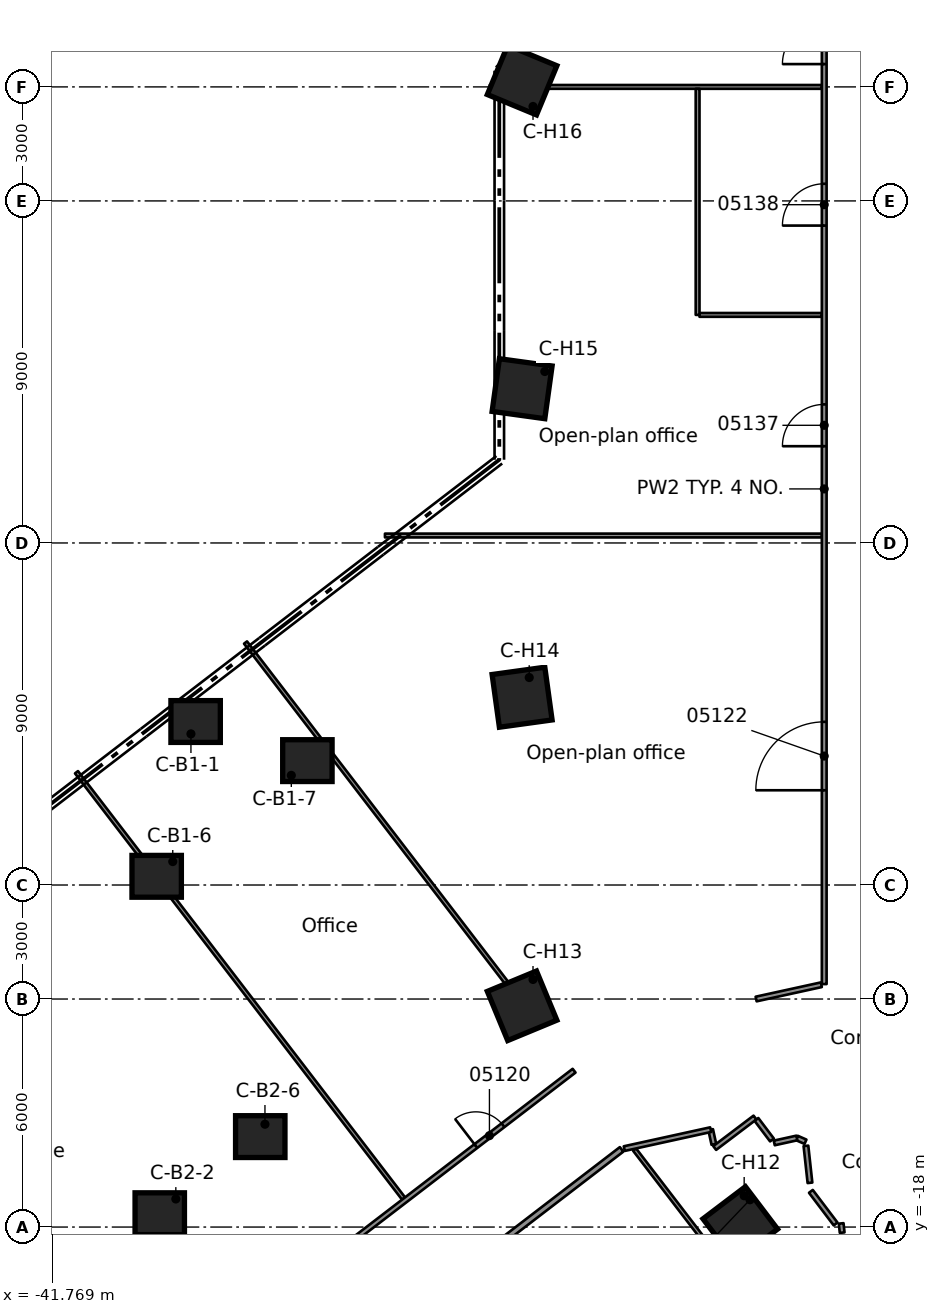
"""IFC4 building model, lengths in metres.
Left out: names, types, materials, properties, quantities, classifications, styles, units other than length and angle.
Written with IfcOpenShell. Run it as: python <this file> out.ifc"""

import sys

from ifc_helpers import new_model, si_unit, direction, frame, frame_2d, origin, origin_2d, place, context, subcontext, project, spatial, rectangle, extrude, element, fill, save


model = new_model("IFC4")
c1 = context("Model", 3, precision=1e-05, world=origin(), true_north=direction((0.0, 1.0)))
c2 = subcontext(c1, "Body", "Model", "MODEL_VIEW")
j1 = project(units=[si_unit("LENGTHUNIT", "METRE"), si_unit("PLANEANGLEUNIT", "RADIAN")], contexts=[c1])
p1 = place(None, origin())
s1 = spatial("IfcSite", under=j1, at=p1, CompositionType="ELEMENT")
p2 = place(p1, origin())
s2 = spatial("IfcBuilding", under=s1, at=p2, CompositionType="ELEMENT")
p3 = place(p2, frame((0.0, 0.0, 25.1)))
s3 = spatial("IfcBuildingStorey", under=s2, at=p3, CompositionType="ELEMENT", Elevation=25.1)
for number, where, z_axis, x_axis in (
    (1, (-37.991, -4.698, 0.0), (0.0, 0.0, 1.0), (1.0, 0.0, 0.0)),
    (2, (-39.016, -8.771, 0.0), (0.0, 0.0, 1.0), (1.0, 0.0, 0.0)),
    (3, (-35.05, -5.727, 0.0), (0.0, 0.0, 1.0), (1.0, 0.0, 0.0)),
    (4, (-38.935, -17.649, 0.0), (0.0, 0.0, 1.0), (1.0, 0.0, 0.0)),
    (5, (-36.29, -15.62, 0.0), (0.0, 0.0, 1.0), (1.0, 0.0, 0.0)),
):
    element("IfcColumn", number, at=place(p3, frame(where, z_axis=z_axis, x_axis=x_axis)), inside=s3, PredefinedType="COLUMN", context=c2, shape_type="SweptSolid", body=[
        extrude(rectangle(XDim=1.3, YDim=1.1, at=origin_2d()), origin(), (0.0, 0.0, 1.0), 4.1),
    ])
for number, where, z_axis, x_axis in (
    (6, (-23.659, -17.919, 0.0), (0.0, 0.0, 1.0), (-0.797, -0.604, 0.0)),
    (7, (-29.4, -12.178, 0.0), (0.0, 0.0, 1.0), (-0.924, -0.383, 0.0)),
    (8, (-29.4, -4.059, 0.0), (0.0, 0.0, 1.0), (-0.991, -0.137, 0.0)),
    (9, (-29.4, 4.059, 0.0), (0.0, 0.0, 1.0), (-0.991, 0.137, 0.0)),
    (10, (-29.4, 12.178, 0.0), (0.0, 0.0, 1.0), (-0.924, 0.383, 0.0)),
):
    element("IfcColumn", number, at=place(p3, frame(where, z_axis=z_axis, x_axis=x_axis)), inside=s3, PredefinedType="COLUMN", context=c2, shape_type="SweptSolid", body=[
        extrude(rectangle(XDim=1.4, YDim=1.4, at=origin_2d()), origin(), (0.0, 0.0, 1.0), 4.1),
    ])
p4 = place(p3, frame((-21.004, -17.904, 0.0), z_axis=(0.0, 0.0, 1.0), x_axis=(0.105933230141, -0.994373245191, 0.0)))
e11 = element("IfcWall", 11, at=p4, inside=s3, PredefinedType="PARTITIONING", context=c2, shape_type="SweptSolid", body=[
    extrude(rectangle(XDim=0.244, YDim=0.125, at=frame_2d((0.122, 0.0))), origin(), (0.0, 0.0, 1.0), 3.68),
])
p5 = place(p3, frame((-21.931, -15.864, 0.0), z_axis=(0.0, 0.0, 1.0), x_axis=(0.10837572028, -0.99411000561, 0.0)))
e12 = element("IfcWall", 12, at=p5, inside=s3, PredefinedType="PARTITIONING", context=c2, shape_type="SweptSolid", body=[
    extrude(rectangle(XDim=0.978, YDim=0.125, at=frame_2d((0.489, 0.0))), origin(), (0.0, 0.0, 1.0), 3.68),
])
p6 = place(p3, frame((-24.438, -15.437, 0.0), z_axis=(0.0, 0.0, 1.0), x_axis=(0.212096867325, -0.977248647413, 0.0)))
e13 = element("IfcWall", 13, at=p6, inside=s3, PredefinedType="PARTITIONING", context=c2, shape_type="SweptSolid", body=[
    extrude(rectangle(XDim=0.396, YDim=0.125, at=frame_2d((0.198, 0.0))), origin(), (0.0, 0.0, 1.0), 3.68),
])
p7 = place(p3, frame((-23.234, -15.168, 0.0), z_axis=(0.0, 0.0, 1.0), x_axis=(0.602990949897, -0.797748026849, 0.0)))
e14 = element("IfcWall", 14, at=p7, inside=s3, PredefinedType="PARTITIONING", context=c2, shape_type="SweptSolid", body=[
    extrude(rectangle(XDim=0.678, YDim=0.125, at=frame_2d((0.339, 0.0))), origin(), (0.0, 0.0, 1.0), 3.68),
])
p8 = place(p3, frame((-21.801, -17.061, 0.0), z_axis=(0.0, 0.0, 1.0), x_axis=(0.604123687543, -0.796890563471, 0.0)))
e15 = element("IfcWall", 15, at=p8, inside=s3, PredefinedType="PARTITIONING", context=c2, shape_type="SweptSolid", body=[
    extrude(rectangle(XDim=1.078, YDim=0.125, at=frame_2d((0.539, 0.0))), origin(), (0.0, 0.0, 1.0), 3.68),
])
p9 = place(p3, frame((-41.126, -6.033, 0.0), z_axis=(0.0, 0.0, 1.0), x_axis=(0.608775561638, -0.793342495743, 0.0)))
e16 = element("IfcWall", 16, at=p9, inside=s3, PredefinedType="PARTITIONING", context=c2, shape_type="SweptSolid", body=[
    extrude(rectangle(XDim=14.136, YDim=0.1, at=frame_2d((7.068, 0.0))), origin(), (0.0, 0.0, 1.0), 3.68),
])
p10 = place(p3, frame((-36.678, -2.62, 0.0), z_axis=(0.0, 0.0, 1.0), x_axis=(0.608767789656, -0.793348459555, 0.0)))
e17 = element("IfcWall", 17, at=p10, inside=s3, PredefinedType="PARTITIONING", context=c2, shape_type="SweptSolid", body=[
    extrude(rectangle(XDim=11.842, YDim=0.1, at=frame_2d((5.921, 0.0))), origin(), (0.0, 0.0, 1.0), 3.68),
])
p11 = place(p3, frame((-26.44, -15.962, 0.0), z_axis=(0.0, 0.0, 1.0), x_axis=(0.608697215762, -0.79340260872, 0.0)))
e18 = element("IfcWall", 18, at=p11, inside=s3, PredefinedType="PARTITIONING", context=c2, shape_type="SweptSolid", body=[
    extrude(rectangle(XDim=6.79, YDim=0.1, at=frame_2d((3.395, 0.0))), origin(), (0.0, 0.0, 1.0), 3.68),
])
p12 = place(p3, frame((-22.17, -15.656, 0.0), z_axis=(0.0, 0.0, 1.0), x_axis=(0.914864311429, -0.403761429156, 0.0)))
e19 = element("IfcWall", 19, at=p12, inside=s3, PredefinedType="PARTITIONING", context=c2, shape_type="SweptSolid", body=[
    extrude(rectangle(XDim=0.248, YDim=0.125, at=frame_2d((0.124, 0.0))), origin(), (0.0, 0.0, 1.0), 3.68),
])
p13 = place(p3, frame((-33.009, 0.196, 0.0), z_axis=(0.0, 0.0, 1.0), x_axis=(1.0, 0.0, 0.0)))
e20 = element("IfcWall", 20, at=p13, inside=s3, PredefinedType="PARTITIONING", context=c2, shape_type="SweptSolid", body=[
    extrude(rectangle(XDim=11.497, YDim=0.1, at=frame_2d((5.749, 0.0))), origin(), (0.0, 0.0, 1.0), 3.68),
])
p14 = place(p3, frame((-24.732, 6.001, 0.0), z_axis=(0.0, 0.0, 1.0), x_axis=(1.0, 0.0, 0.0)))
e21 = element("IfcWall", 21, at=p14, inside=s3, PredefinedType="PARTITIONING", context=c2, shape_type="SweptSolid", body=[
    extrude(rectangle(XDim=3.22, YDim=0.1, at=frame_2d((1.61, 0.0))), origin(), (0.0, 0.0, 1.0), 3.68),
])
p15 = place(p3, frame((-30.25, 12.0, 0.0), z_axis=(0.0, 0.0, 1.0), x_axis=(1.0, 0.0, 0.0)))
e22 = element("IfcWall", 22, at=p15, inside=s3, PredefinedType="PARTITIONING", context=c2, shape_type="SweptSolid", body=[
    extrude(rectangle(XDim=8.738, YDim=0.1, at=frame_2d((4.369, 0.0))), origin(), (0.0, 0.0, 1.0), 3.68),
])
p16 = place(p3, frame((-26.712, -15.936, 0.0), z_axis=(0.0, 0.0, 1.0), x_axis=(0.976756126143, 0.214353609817, 0.0)))
e23 = element("IfcWall", 23, at=p16, inside=s3, PredefinedType="PARTITIONING", context=c2, shape_type="SweptSolid", body=[
    extrude(rectangle(XDim=2.328, YDim=0.125, at=frame_2d((1.164, 0.0))), origin(), (0.0, 0.0, 1.0), 3.68),
])
p17 = place(p3, frame((-22.765, -15.787, 0.0), z_axis=(0.0, 0.0, 1.0), x_axis=(0.97657209397, 0.215190486033, 0.0)))
e24 = element("IfcWall", 24, at=p17, inside=s3, PredefinedType="PARTITIONING", context=c2, shape_type="SweptSolid", body=[
    extrude(rectangle(XDim=0.609, YDim=0.125, at=frame_2d((0.305, 0.0))), origin(), (0.0, 0.0, 1.0), 3.68),
])
p18 = place(p3, frame((-23.242, -12.0, 0.0), z_axis=(0.0, 0.0, 1.0), x_axis=(0.976830155766, 0.214015996568, 0.0)))
e25 = element("IfcWall", 25, at=p18, inside=s3, PredefinedType="PARTITIONING", context=c2, shape_type="SweptSolid", body=[
    extrude(rectangle(XDim=1.757, YDim=0.125, at=frame_2d((0.878, 0.0))), origin(), (0.0, 0.0, 1.0), 3.68),
])
p19 = place(p3, frame((-24.332, -15.92, 0.0), z_axis=(0.0, 0.0, 1.0), x_axis=(0.797480426333, 0.603344818172, 0.0)))
e26 = element("IfcWall", 26, at=p19, inside=s3, PredefinedType="PARTITIONING", context=c2, shape_type="SweptSolid", body=[
    extrude(rectangle(XDim=1.329, YDim=0.125, at=frame_2d((0.665, 0.0))), origin(), (0.0, 0.0, 1.0), 3.68),
])
p20 = place(p3, frame((-44.11, -29.247, 0.0), z_axis=(0.0, 0.0, 1.0), x_axis=(0.793471030698, 0.608608021179, 0.0)))
e27 = element("IfcWall", 27, at=p20, inside=s3, PredefinedType="PARTITIONING", context=c2, shape_type="SweptSolid", body=[
    extrude(rectangle(XDim=21.838, YDim=0.15, at=frame_2d((10.919, 0.0))), origin(), (0.0, 0.0, 1.0), 3.68),
])
p21 = place(p3, frame((-35.881, -19.906, 0.0), z_axis=(0.0, 0.0, 1.0), x_axis=(0.793491146474, 0.608581794394, 0.0)))
e28 = element("IfcWall", 28, at=p21, inside=s3, PredefinedType="PARTITIONING", context=c2, shape_type="SweptSolid", body=[
    extrude(rectangle(XDim=9.892, YDim=0.125, at=frame_2d((4.946, 0.0))), origin(), (0.0, 0.0, 1.0), 3.68),
])
p22 = place(p21, frame((6.634, 0.0, 0.0)))
e29 = element("IfcOpeningElement", 29, at=p22, cuts=e28, PredefinedType="OPENING", context=c2, shape_type="SweptSolid", body=[
    extrude(rectangle(XDim=0.9, YDim=2.1, at=frame_2d((0.45, 1.05))), frame((0.0, 0.073, 0.0), z_axis=(0.0, -1.0, 0.0), x_axis=(1.0, 0.0, 0.0)), (0.0, 0.0, 1.0), 0.145),
])
p23 = place(p3, frame((-21.45, -11.607, 0.0), z_axis=(0.0, 0.0, 1.0), x_axis=(0.0, 1.0, 0.0)))
e30 = element("IfcWall", 30, at=p23, inside=s3, PredefinedType="PARTITIONING", context=c2, shape_type="SweptSolid", body=[
    extrude(rectangle(XDim=26.058, YDim=0.125, at=frame_2d((13.029, 0.0))), origin(), (0.0, 0.0, 1.0), 3.68),
])
p24 = place(p23, frame((5.1, 0.0, 0.0)))
e31 = element("IfcOpeningElement", 31, at=p24, cuts=e30, PredefinedType="OPENING", context=c2, shape_type="SweptSolid", body=[
    extrude(rectangle(XDim=1.8, YDim=2.1, at=frame_2d((0.9, 1.05))), frame((0.0, 0.073, 0.0), z_axis=(0.0, -1.0, 0.0), x_axis=(1.0, 0.0, 0.0)), (0.0, 0.0, 1.0), 0.145),
])
p25 = place(p23, frame((24.207, 0.0, 0.0)))
e32 = element("IfcOpeningElement", 32, at=p25, cuts=e30, PredefinedType="OPENING", context=c2, shape_type="SweptSolid", body=[
    extrude(rectangle(XDim=1.1, YDim=2.1, at=frame_2d((0.55, 1.05))), frame((0.0, 0.073, 0.0), z_axis=(0.0, -1.0, 0.0), x_axis=(1.0, 0.0, 0.0)), (0.0, 0.0, 1.0), 0.145),
])
p26 = place(p23, frame((14.153, 0.0, 0.0)))
e33 = element("IfcOpeningElement", 33, at=p26, cuts=e30, PredefinedType="OPENING", context=c2, shape_type="SweptSolid", body=[
    extrude(rectangle(XDim=1.1, YDim=2.1, at=frame_2d((0.55, 1.05))), frame((0.0, 0.073, 0.0), z_axis=(0.0, -1.0, 0.0), x_axis=(1.0, 0.0, 0.0)), (0.0, 0.0, 1.0), 0.145),
])
p27 = place(p23, frame((19.958, 0.0, 0.0)))
e34 = element("IfcOpeningElement", 34, at=p27, cuts=e30, PredefinedType="OPENING", context=c2, shape_type="SweptSolid", body=[
    extrude(rectangle(XDim=1.1, YDim=2.1, at=frame_2d((0.55, 1.05))), frame((0.0, 0.073, 0.0), z_axis=(0.0, -1.0, 0.0), x_axis=(1.0, 0.0, 0.0)), (0.0, 0.0, 1.0), 0.145),
])
p28 = place(p3, frame((-24.782, 6.001, 0.0), z_axis=(0.0, 0.0, 1.0), x_axis=(0.0, 1.0, 0.0)))
e35 = element("IfcWall", 35, at=p28, inside=s3, PredefinedType="PARTITIONING", context=c2, shape_type="SweptSolid", body=[
    extrude(rectangle(XDim=5.949, YDim=0.1, at=frame_2d((2.975, 0.0))), origin(), (0.0, 0.0, 1.0), 3.68),
])
p29 = place(p22, origin())
e36 = element("IfcDoor", 36, at=p29, inside=s3, OperationType="SINGLE_SWING_RIGHT", PredefinedType="DOOR", context=c2, shape_type="SweptSolid", body=[
    extrude(rectangle(XDim=0.9, YDim=2.1, at=frame_2d((0.45, 1.05))), frame((0.0, 0.025, 0.0), z_axis=(0.0, -1.0, 0.0), x_axis=(1.0, 0.0, 0.0)), (0.0, 0.0, 1.0), 0.05),
])
fill(e29, e36)
p30 = place(p24, origin())
e37 = element("IfcDoor", 37, at=p30, inside=s3, OperationType="DOUBLE_DOOR_SINGLE_SWING", PredefinedType="DOOR", context=c2, shape_type="SweptSolid", body=[
    extrude(rectangle(XDim=1.8, YDim=2.1, at=frame_2d((0.9, 1.05))), frame((0.0, 0.025, 0.0), z_axis=(0.0, -1.0, 0.0), x_axis=(1.0, 0.0, 0.0)), (0.0, 0.0, 1.0), 0.05),
])
fill(e31, e37)
p31 = place(p25, origin())
e38 = element("IfcDoor", 38, at=p31, inside=s3, OperationType="SINGLE_SWING_RIGHT", PredefinedType="DOOR", context=c2, shape_type="SweptSolid", body=[
    extrude(rectangle(XDim=1.1, YDim=2.1, at=frame_2d((0.55, 1.05))), frame((0.0, 0.025, 0.0), z_axis=(0.0, -1.0, 0.0), x_axis=(1.0, 0.0, 0.0)), (0.0, 0.0, 1.0), 0.05),
])
fill(e32, e38)
p32 = place(p26, origin())
e39 = element("IfcDoor", 39, at=p32, inside=s3, OperationType="SINGLE_SWING_RIGHT", PredefinedType="DOOR", context=c2, shape_type="SweptSolid", body=[
    extrude(rectangle(XDim=1.1, YDim=2.1, at=frame_2d((0.55, 1.05))), frame((0.0, 0.025, 0.0), z_axis=(0.0, -1.0, 0.0), x_axis=(1.0, 0.0, 0.0)), (0.0, 0.0, 1.0), 0.05),
])
fill(e33, e39)
p33 = place(p27, origin())
e40 = element("IfcDoor", 40, at=p33, inside=s3, OperationType="SINGLE_SWING_RIGHT", PredefinedType="DOOR", context=c2, shape_type="SweptSolid", body=[
    extrude(rectangle(XDim=1.1, YDim=2.1, at=frame_2d((0.55, 1.05))), frame((0.0, 0.025, 0.0), z_axis=(0.0, -1.0, 0.0), x_axis=(1.0, 0.0, 0.0)), (0.0, 0.0, 1.0), 0.05),
])
fill(e34, e40)
save(model, sys.argv[1])
